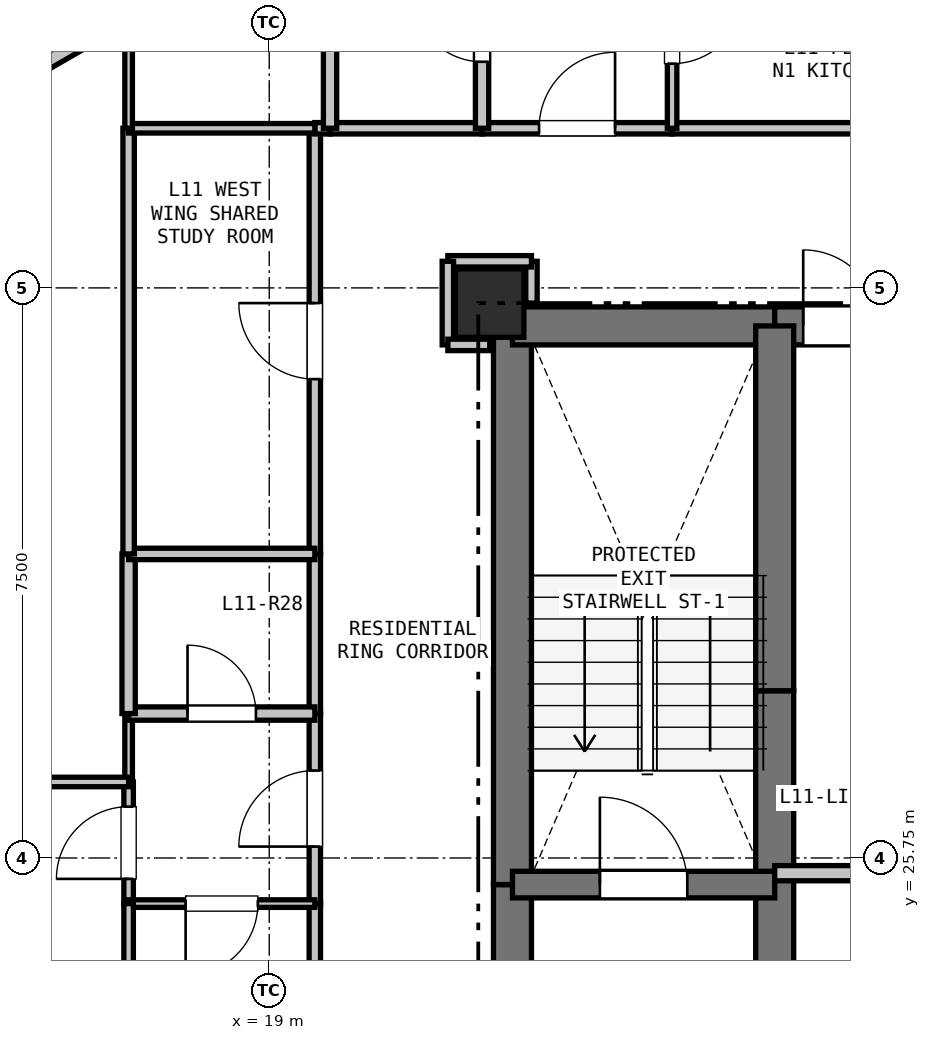
"""IFC4 building model, lengths in metres.
Left out: names, types, materials, properties, quantities, classifications, styles, units other than length and angle.
Written with IfcOpenShell. Run it as: python <this file> out.ifc"""

import sys

from ifc_helpers import new_model, si_unit, direction, frame, frame_2d, origin, origin_2d, place, context, subcontext, project, spatial, rectangle, extrude, element, fill, save


model = new_model("IFC4")
c1 = context("Model", 3, precision=1e-05, world=origin(), true_north=direction((0.0, 1.0)))
c2 = subcontext(c1, "Body", "Model", "MODEL_VIEW")
j1 = project(units=[si_unit("LENGTHUNIT", "METRE"), si_unit("PLANEANGLEUNIT", "RADIAN")], contexts=[c1])
p1 = place(None, origin())
s1 = spatial("IfcSite", under=j1, at=p1, CompositionType="ELEMENT")
p2 = place(p1, origin())
s2 = spatial("IfcBuilding", under=s1, at=p2, CompositionType="ELEMENT")
p3 = place(p2, frame((0.0, 0.0, 42.3)))
s3 = spatial("IfcBuildingStorey", under=s2, at=p3, CompositionType="ELEMENT", Elevation=42.3)
p4 = place(p3, frame((21.9, 33.05, 0.0), z_axis=(0.0, 0.0, 1.0), x_axis=(1.0, 0.0, 0.0)))
e1 = element("IfcColumn", 1, at=p4, inside=s3, PredefinedType="COLUMN", context=c2, shape_type="SweptSolid", body=[
    extrude(rectangle(XDim=0.9, YDim=0.9, at=origin_2d()), origin(), (0.0, 0.0, 1.0), 3.3),
])
p5 = place(p3, frame((15.008, 35.611, 0.0), z_axis=(0.0, 0.0, 1.0), x_axis=(0.86605165483, 0.499954529098, 0.0)))
e2 = element("IfcWall", 2, at=p5, inside=s3, PredefinedType="PARAPET", context=c2, shape_type="SweptSolid", body=[
    extrude(rectangle(XDim=1.7, YDim=0.2, at=frame_2d((0.85, 0.0))), origin(), (0.0, 0.0, 1.0), 2.66),
])
p6 = place(p3, frame((22.2, 20.75, 0.0), z_axis=(0.0, 0.0, 1.0), x_axis=(0.0, 1.0, 0.0)))
e3 = element("IfcWall", 3, at=p6, inside=s3, PredefinedType="SHEAR", context=c2, shape_type="SweptSolid", body=[
    extrude(rectangle(XDim=4.65, YDim=0.5, at=frame_2d((2.325, 0.0))), origin(), (0.0, 0.0, 1.0), 3.04),
])
p7 = place(p3, frame((22.2, 25.4, 0.0), z_axis=(0.0, 0.0, 1.0), x_axis=(0.0, 1.0, 0.0)))
e4 = element("IfcWall", 4, at=p7, inside=s3, PredefinedType="SHEAR", context=c2, shape_type="SweptSolid", body=[
    extrude(rectangle(XDim=7.35, YDim=0.5, at=frame_2d((3.675, 0.0))), origin(), (0.0, 0.0, 1.0), 3.04),
])
p8 = place(p3, frame((22.2, 32.75, 0.0), z_axis=(0.0, 0.0, 1.0), x_axis=(1.0, 0.0, 0.0)))
e5 = element("IfcWall", 5, at=p8, inside=s3, PredefinedType="SHEAR", context=c2, shape_type="SweptSolid", body=[
    extrude(rectangle(XDim=3.45, YDim=0.5, at=frame_2d((1.725, 0.0))), origin(), (0.0, 0.0, 1.0), 3.04),
])
p9 = place(p3, frame((25.65, 32.75, 0.0), z_axis=(0.0, 0.0, 1.0), x_axis=(1.0, 0.0, 0.0)))
e6 = element("IfcWall", 6, at=p9, inside=s3, PredefinedType="SHEAR", context=c2, shape_type="SweptSolid", body=[
    extrude(rectangle(XDim=1.75, YDim=0.5, at=frame_2d((0.875, 0.0))), origin(), (0.0, 0.0, 1.0), 3.04),
])
p10 = place(p9, frame((0.375, 0.0, 0.0)))
e7 = element("IfcOpeningElement", 7, at=p10, cuts=e6, PredefinedType="OPENING", context=c2, shape_type="SweptSolid", body=[
    extrude(rectangle(XDim=1.0, YDim=2.15, at=frame_2d((0.5, 1.075))), frame((0.0, 0.26, 0.0), z_axis=(0.0, -1.0, 0.0), x_axis=(1.0, 0.0, 0.0)), (0.0, 0.0, 1.0), 0.52),
])
p11 = place(p3, frame((25.65, 22.75, 0.0), z_axis=(0.0, 0.0, 1.0), x_axis=(0.0, 1.0, 0.0)))
e8 = element("IfcWall", 8, at=p11, inside=s3, PredefinedType="SHEAR", context=c2, shape_type="SweptSolid", body=[
    extrude(rectangle(XDim=2.8, YDim=0.5, at=frame_2d((1.4, 0.0))), origin(), (0.0, 0.0, 1.0), 3.04),
])
p12 = place(p3, frame((25.65, 25.55, 0.0), z_axis=(0.0, 0.0, 1.0), x_axis=(0.0, 1.0, 0.0)))
e9 = element("IfcWall", 9, at=p12, inside=s3, PredefinedType="SHEAR", context=c2, shape_type="SweptSolid", body=[
    extrude(rectangle(XDim=2.4, YDim=0.5, at=frame_2d((1.2, 0.0))), origin(), (0.0, 0.0, 1.0), 3.04),
])
p13 = place(p3, frame((25.65, 27.95, 0.0), z_axis=(0.0, 0.0, 1.0), x_axis=(0.0, 1.0, 0.0)))
e10 = element("IfcWall", 10, at=p13, inside=s3, PredefinedType="SHEAR", context=c2, shape_type="SweptSolid", body=[
    extrude(rectangle(XDim=4.8, YDim=0.5, at=frame_2d((2.4, 0.0))), origin(), (0.0, 0.0, 1.0), 3.04),
])
p14 = place(p3, frame((22.2, 25.4, 0.0), z_axis=(0.0, 0.0, 1.0), x_axis=(1.0, 0.0, 0.0)))
e11 = element("IfcWall", 11, at=p14, inside=s3, PredefinedType="SHEAR", context=c2, shape_type="SweptSolid", body=[
    extrude(rectangle(XDim=3.45, YDim=0.35, at=frame_2d((1.725, 0.0))), origin(), (0.0, 0.0, 1.0), 3.04),
])
p15 = place(p14, frame((1.15, 0.0, 0.0)))
e12 = element("IfcOpeningElement", 12, at=p15, cuts=e11, PredefinedType="OPENING", context=c2, shape_type="SweptSolid", body=[
    extrude(rectangle(XDim=1.15, YDim=2.15, at=frame_2d((0.575, 1.075))), frame((0.0, 0.185, 0.0), z_axis=(0.0, -1.0, 0.0), x_axis=(1.0, 0.0, 0.0)), (0.0, 0.0, 1.0), 0.37),
])
p16 = place(p3, frame((25.65, 25.55, 0.0), z_axis=(0.0, 0.0, 1.0), x_axis=(1.0, 0.0, 0.0)))
e13 = element("IfcWall", 13, at=p16, inside=s3, PredefinedType="PARTITIONING", context=c2, shape_type="SweptSolid", body=[
    extrude(rectangle(XDim=4.95, YDim=0.2, at=frame_2d((2.475, 0.0))), origin(), (0.0, 0.0, 1.0), 3.04),
])
p17 = place(p3, frame((19.6, 21.15, 0.0), z_axis=(0.0, 0.0, 1.0), x_axis=(0.0, 1.0, 0.0)))
e14 = element("IfcWall", 14, at=p17, inside=s3, PredefinedType="PARTITIONING", context=c2, shape_type="SweptSolid", body=[
    extrude(rectangle(XDim=4.0, YDim=0.15, at=frame_2d((2.0, 0.0))), origin(), (0.0, 0.0, 1.0), 3.04),
])
p18 = place(p3, frame((19.6, 25.15, 0.0), z_axis=(0.0, 0.0, 1.0), x_axis=(0.0, 1.0, 0.0)))
e15 = element("IfcWall", 15, at=p18, inside=s3, PredefinedType="PARTITIONING", context=c2, shape_type="SweptSolid", body=[
    extrude(rectangle(XDim=2.5, YDim=0.15, at=frame_2d((1.25, 0.0))), origin(), (0.0, 0.0, 1.0), 3.04),
])
p19 = place(p18, frame((0.75, 0.0, 0.0)))
e16 = element("IfcOpeningElement", 16, at=p19, cuts=e15, PredefinedType="OPENING", context=c2, shape_type="SweptSolid", body=[
    extrude(rectangle(XDim=1.0, YDim=2.15, at=frame_2d((0.5, 1.075))), frame((0.0, 0.085, 0.0), z_axis=(0.0, -1.0, 0.0), x_axis=(1.0, 0.0, 0.0)), (0.0, 0.0, 1.0), 0.17),
])
p20 = place(p3, frame((19.6, 27.65, 0.0), z_axis=(0.0, 0.0, 1.0), x_axis=(0.0, 1.0, 0.0)))
e17 = element("IfcWall", 17, at=p20, inside=s3, PredefinedType="PARTITIONING", context=c2, shape_type="SweptSolid", body=[
    extrude(rectangle(XDim=2.1, YDim=0.15, at=frame_2d((1.05, 0.0))), origin(), (0.0, 0.0, 1.0), 3.04),
])
p21 = place(p3, frame((19.6, 29.75, 0.0), z_axis=(0.0, 0.0, 1.0), x_axis=(0.0, 1.0, 0.0)))
e18 = element("IfcWall", 18, at=p21, inside=s3, PredefinedType="PARTITIONING", context=c2, shape_type="SweptSolid", body=[
    extrude(rectangle(XDim=5.6, YDim=0.15, at=frame_2d((2.8, 0.0))), origin(), (0.0, 0.0, 1.0), 2.337),
])
p22 = place(p21, frame((2.3, 0.0, 0.0)))
e19 = element("IfcOpeningElement", 19, at=p22, cuts=e18, PredefinedType="OPENING", context=c2, shape_type="SweptSolid", body=[
    extrude(rectangle(XDim=1.0, YDim=2.15, at=frame_2d((0.5, 1.075))), frame((0.0, 0.085, 0.0), z_axis=(0.0, -1.0, 0.0), x_axis=(1.0, 0.0, 0.0)), (0.0, 0.0, 1.0), 0.17),
])
p23 = place(p3, frame((19.6, 35.35, 0.0), z_axis=(0.0, 0.0, 1.0), x_axis=(1.0, 0.0, 0.0)))
e20 = element("IfcWall", 20, at=p23, inside=s3, PredefinedType="PARTITIONING", context=c2, shape_type="SweptSolid", body=[
    extrude(rectangle(XDim=0.2, YDim=0.15, at=frame_2d((0.1, 0.0))), origin(), (0.0, 0.0, 1.0), 3.04),
])
p24 = place(p3, frame((19.8, 35.35, 0.0), z_axis=(0.0, 0.0, 1.0), x_axis=(1.0, 0.0, 0.0)))
e21 = element("IfcWall", 21, at=p24, inside=s3, PredefinedType="PARTITIONING", context=c2, shape_type="SweptSolid", body=[
    extrude(rectangle(XDim=2.0, YDim=0.15, at=frame_2d((1.0, 0.0))), origin(), (0.0, 0.0, 1.0), 3.04),
])
p25 = place(p3, frame((21.8, 35.35, 0.0), z_axis=(0.0, 0.0, 1.0), x_axis=(1.0, 0.0, 0.0)))
e22 = element("IfcWall", 22, at=p25, inside=s3, PredefinedType="PARTITIONING", context=c2, shape_type="SweptSolid", body=[
    extrude(rectangle(XDim=2.5, YDim=0.15, at=frame_2d((1.25, 0.0))), origin(), (0.0, 0.0, 1.0), 3.04),
])
p26 = place(p25, frame((0.75, 0.0, 0.0)))
e23 = element("IfcOpeningElement", 23, at=p26, cuts=e22, PredefinedType="OPENING", context=c2, shape_type="SweptSolid", body=[
    extrude(rectangle(XDim=1.0, YDim=2.15, at=frame_2d((0.5, 1.075))), frame((0.0, 0.085, 0.0), z_axis=(0.0, -1.0, 0.0), x_axis=(1.0, 0.0, 0.0)), (0.0, 0.0, 1.0), 0.17),
])
p27 = place(p3, frame((24.3, 35.35, 0.0), z_axis=(0.0, 0.0, 1.0), x_axis=(1.0, 0.0, 0.0)))
e24 = element("IfcWall", 24, at=p27, inside=s3, PredefinedType="PARTITIONING", context=c2, shape_type="SweptSolid", body=[
    extrude(rectangle(XDim=3.1, YDim=0.15, at=frame_2d((1.55, 0.0))), origin(), (0.0, 0.0, 1.0), 3.04),
])
p28 = place(p3, frame((22.45, 33.05, 0.0), z_axis=(0.0, 0.0, 1.0), x_axis=(0.0, 1.0, 0.0)))
e25 = element("IfcWall", 25, at=p28, inside=s3, PredefinedType="PARTITIONING", context=c2, shape_type="SweptSolid", body=[
    extrude(rectangle(XDim=0.55, YDim=0.15, at=frame_2d((0.275, 0.0))), origin(), (0.0, 0.0, 1.0), 2.488),
])
p29 = place(p3, frame((22.45, 33.6, 0.0), z_axis=(0.0, 0.0, 1.0), x_axis=(-1.0, 0.0, 0.0)))
e26 = element("IfcWall", 26, at=p29, inside=s3, PredefinedType="PARTITIONING", context=c2, shape_type="SweptSolid", body=[
    extrude(rectangle(XDim=1.1, YDim=0.15, at=frame_2d((0.55, 0.0))), origin(), (0.0, 0.0, 1.0), 3.04),
])
p30 = place(p3, frame((21.35, 33.6, 0.0), z_axis=(0.0, 0.0, 1.0), x_axis=(0.0, -1.0, 0.0)))
e27 = element("IfcWall", 27, at=p30, inside=s3, PredefinedType="PARTITIONING", context=c2, shape_type="SweptSolid", body=[
    extrude(rectangle(XDim=1.1, YDim=0.15, at=frame_2d((0.55, 0.0))), origin(), (0.0, 0.0, 1.0), 2.337),
])
p31 = place(p3, frame((21.35, 32.5, 0.0), z_axis=(0.0, 0.0, 1.0), x_axis=(1.0, 0.0, 0.0)))
e28 = element("IfcWall", 28, at=p31, inside=s3, PredefinedType="PARTITIONING", context=c2, shape_type="SweptSolid", body=[
    extrude(rectangle(XDim=0.55, YDim=0.15, at=frame_2d((0.275, 0.0))), origin(), (0.0, 0.0, 1.0), 2.488),
])
p32 = place(p3, frame((24.3, 38.0, 0.0), z_axis=(0.0, 0.0, 1.0), x_axis=(0.0, -1.0, 0.0)))
e29 = element("IfcWall", 29, at=p32, inside=s3, PredefinedType="PARTITIONING", context=c2, shape_type="SweptSolid", body=[
    extrude(rectangle(XDim=2.65, YDim=0.125, at=frame_2d((1.325, 0.0))), origin(), (0.0, 0.0, 1.0), 3.04),
])
p33 = place(p32, frame((0.85, 0.0, 0.0)))
e30 = element("IfcOpeningElement", 30, at=p33, cuts=e29, PredefinedType="OPENING", context=c2, shape_type="SweptSolid", body=[
    extrude(rectangle(XDim=0.95, YDim=2.1, at=frame_2d((0.475, 1.05))), frame((0.0, 0.073, 0.0), z_axis=(0.0, -1.0, 0.0), x_axis=(1.0, 0.0, 0.0)), (0.0, 0.0, 1.0), 0.145),
])
p34 = place(p3, frame((21.8, 35.35, 0.0), z_axis=(0.0, 0.0, 1.0), x_axis=(0.0, 1.0, 0.0)))
e31 = element("IfcWall", 31, at=p34, inside=s3, PredefinedType="PLUMBINGWALL", context=c2, shape_type="SweptSolid", body=[
    extrude(rectangle(XDim=2.65, YDim=0.175, at=frame_2d((1.325, 0.0))), origin(), (0.0, 0.0, 1.0), 3.04),
])
p35 = place(p34, frame((0.875, 0.0, 0.0)))
e32 = element("IfcOpeningElement", 32, at=p35, cuts=e31, PredefinedType="OPENING", context=c2, shape_type="SweptSolid", body=[
    extrude(rectangle(XDim=0.9, YDim=2.1, at=frame_2d((0.45, 1.05))), frame((0.0, 0.097, 0.0), z_axis=(0.0, -1.0, 0.0), x_axis=(1.0, 0.0, 0.0)), (0.0, 0.0, 1.0), 0.195),
])
p36 = place(p3, frame((17.15, 25.15, 0.0), z_axis=(0.0, 0.0, 1.0), x_axis=(0.0, 1.0, 0.0)))
e33 = element("IfcWall", 33, at=p36, inside=s3, PredefinedType="PARTITIONING", context=c2, shape_type="SweptSolid", body=[
    extrude(rectangle(XDim=1.6, YDim=0.125, at=frame_2d((0.8, 0.0))), origin(), (0.0, 0.0, 1.0), 3.04),
])
p37 = place(p36, frame((0.325, 0.0, 0.0)))
e34 = element("IfcOpeningElement", 34, at=p37, cuts=e33, PredefinedType="OPENING", context=c2, shape_type="SweptSolid", body=[
    extrude(rectangle(XDim=0.95, YDim=2.1, at=frame_2d((0.475, 1.05))), frame((0.0, 0.073, 0.0), z_axis=(0.0, -1.0, 0.0), x_axis=(1.0, 0.0, 0.0)), (0.0, 0.0, 1.0), 0.145),
])
p38 = place(p3, frame((17.15, 26.75, 0.0), z_axis=(0.0, 0.0, 1.0), x_axis=(0.0, 1.0, 0.0)))
e35 = element("IfcWall", 35, at=p38, inside=s3, PredefinedType="PARTITIONING", context=c2, shape_type="SweptSolid", body=[
    extrude(rectangle(XDim=0.9, YDim=0.1, at=frame_2d((0.45, 0.0))), origin(), (0.0, 0.0, 1.0), 3.04),
])
p39 = place(p3, frame((17.15, 27.65, 0.0), z_axis=(0.0, 0.0, 1.0), x_axis=(1.0, 0.0, 0.0)))
e36 = element("IfcWall", 36, at=p39, inside=s3, PredefinedType="PLUMBINGWALL", context=c2, shape_type="SweptSolid", body=[
    extrude(rectangle(XDim=2.45, YDim=0.175, at=frame_2d((1.225, 0.0))), origin(), (0.0, 0.0, 1.0), 3.04),
])
p40 = place(p39, frame((0.775, 0.0, 0.0)))
e37 = element("IfcOpeningElement", 37, at=p40, cuts=e36, PredefinedType="OPENING", context=c2, shape_type="SweptSolid", body=[
    extrude(rectangle(XDim=0.9, YDim=2.1, at=frame_2d((0.45, 1.05))), frame((0.0, 0.097, 0.0), z_axis=(0.0, -1.0, 0.0), x_axis=(1.0, 0.0, 0.0)), (0.0, 0.0, 1.0), 0.195),
])
p41 = place(p3, frame((19.6, 25.15, 0.0), z_axis=(0.0, 0.0, 1.0), x_axis=(-1.0, 0.0, 0.0)))
e38 = element("IfcWall", 38, at=p41, inside=s3, PredefinedType="PARTITIONING", context=c2, shape_type="SweptSolid", body=[
    extrude(rectangle(XDim=2.45, YDim=0.1, at=frame_2d((1.225, 0.0))), origin(), (0.0, 0.0, 1.0), 3.04),
])
p42 = place(p41, frame((0.75, 0.0, 0.0)))
e39 = element("IfcOpeningElement", 39, at=p42, cuts=e38, PredefinedType="OPENING", context=c2, shape_type="SweptSolid", body=[
    extrude(rectangle(XDim=0.95, YDim=2.1, at=frame_2d((0.475, 1.05))), frame((0.0, 0.06, 0.0), z_axis=(0.0, -1.0, 0.0), x_axis=(1.0, 0.0, 0.0)), (0.0, 0.0, 1.0), 0.12),
])
p43 = place(p3, frame((19.8, 35.35, 0.0), z_axis=(0.0, 0.0, 1.0), x_axis=(0.0, 1.0, 0.0)))
e40 = element("IfcWall", 40, at=p43, inside=s3, PredefinedType="PLUMBINGWALL", context=c2, shape_type="SweptSolid", body=[
    extrude(rectangle(XDim=3.194, YDim=0.175, at=frame_2d((1.597, 0.0))), origin(), (0.0, 0.0, 1.0), 2.365),
])
p44 = place(p3, frame((17.15, 27.65, 0.0), z_axis=(0.0, 0.0, 1.0), x_axis=(0.0, 1.0, 0.0)))
e41 = element("IfcWall", 41, at=p44, inside=s3, PredefinedType="PLUMBINGWALL", context=c2, shape_type="SweptSolid", body=[
    extrude(rectangle(XDim=2.1, YDim=0.175, at=frame_2d((1.05, 0.0))), origin(), (0.0, 0.0, 1.0), 3.04),
])
p45 = place(p3, frame((17.15, 29.75, 0.0), z_axis=(0.0, 0.0, 1.0), x_axis=(1.0, 0.0, 0.0)))
e42 = element("IfcWall", 42, at=p45, inside=s3, PredefinedType="PARTITIONING", context=c2, shape_type="SweptSolid", body=[
    extrude(rectangle(XDim=2.45, YDim=0.15, at=frame_2d((1.225, 0.0))), origin(), (0.0, 0.0, 1.0), 3.04),
])
p46 = place(p3, frame((17.15, 21.15, 0.0), z_axis=(0.0, 0.0, 1.0), x_axis=(0.0, 1.0, 0.0)))
e43 = element("IfcWall", 43, at=p46, inside=s3, PredefinedType="PARTITIONING", context=c2, shape_type="SweptSolid", body=[
    extrude(rectangle(XDim=4.0, YDim=0.125, at=frame_2d((2.0, 0.0))), origin(), (0.0, 0.0, 1.0), 2.337),
])
p47 = place(p46, frame((1.525, 0.0, 0.0)))
e44 = element("IfcOpeningElement", 44, at=p47, cuts=e43, PredefinedType="OPENING", context=c2, shape_type="SweptSolid", body=[
    extrude(rectangle(XDim=0.95, YDim=2.1, at=frame_2d((0.475, 1.05))), frame((0.0, 0.073, 0.0), z_axis=(0.0, -1.0, 0.0), x_axis=(1.0, 0.0, 0.0)), (0.0, 0.0, 1.0), 0.145),
])
p48 = place(p3, frame((17.15, 29.75, 0.0), z_axis=(0.0, 0.0, 1.0), x_axis=(0.0, 1.0, 0.0)))
e45 = element("IfcWall", 45, at=p48, inside=s3, PredefinedType="PARTITIONING", context=c2, shape_type="SweptSolid", body=[
    extrude(rectangle(XDim=5.6, YDim=0.15, at=frame_2d((2.8, 0.0))), origin(), (0.0, 0.0, 1.0), 2.337),
])
p49 = place(p3, frame((17.15, 35.35, 0.0), z_axis=(0.0, 0.0, 1.0), x_axis=(1.0, 0.0, 0.0)))
e46 = element("IfcWall", 46, at=p49, inside=s3, PredefinedType="PARTITIONING", context=c2, shape_type="SweptSolid", body=[
    extrude(rectangle(XDim=2.45, YDim=0.125, at=frame_2d((1.225, 0.0))), origin(), (0.0, 0.0, 1.0), 3.04),
])
p50 = place(p3, frame((17.15, 37.014, 0.0), z_axis=(0.0, 0.0, 1.0), x_axis=(0.0, -1.0, 0.0)))
e47 = element("IfcWall", 47, at=p50, inside=s3, PredefinedType="PARTITIONING", context=c2, shape_type="SweptSolid", body=[
    extrude(rectangle(XDim=1.664, YDim=0.1, at=frame_2d((0.832, 0.0))), origin(), (0.0, 0.0, 1.0), 2.365),
])
p51 = place(p3, frame((17.15, 26.75, 0.0), z_axis=(0.0, 0.0, 1.0), x_axis=(-1.0, 0.0, 0.0)))
e48 = element("IfcWall", 48, at=p51, inside=s3, PredefinedType="PARTITIONING", context=c2, shape_type="SweptSolid", body=[
    extrude(rectangle(XDim=6.67, YDim=0.125, at=frame_2d((3.335, 0.0))), origin(), (0.0, 0.0, 1.0), 3.04),
])
p52 = place(p51, frame((2.86, 0.0, 0.0)))
e49 = element("IfcOpeningElement", 49, at=p52, cuts=e48, PredefinedType="OPENING", context=c2, shape_type="SweptSolid", body=[
    extrude(rectangle(XDim=0.95, YDim=2.1, at=frame_2d((0.475, 1.05))), frame((0.0, 0.073, 0.0), z_axis=(0.0, -1.0, 0.0), x_axis=(1.0, 0.0, 0.0)), (0.0, 0.0, 1.0), 0.145),
])
p53 = place(p10, origin())
e50 = element("IfcDoor", 50, at=p53, inside=s3, OperationType="SINGLE_SWING_LEFT", PredefinedType="DOOR", context=c2, shape_type="SweptSolid", body=[
    extrude(rectangle(XDim=1.0, YDim=2.15, at=frame_2d((0.5, 1.075))), frame((0.0, 0.025, 0.0), z_axis=(0.0, -1.0, 0.0), x_axis=(1.0, 0.0, 0.0)), (0.0, 0.0, 1.0), 0.05),
])
fill(e7, e50)
p54 = place(p15, origin())
e51 = element("IfcDoor", 51, at=p54, inside=s3, OperationType="SINGLE_SWING_LEFT", PredefinedType="DOOR", context=c2, shape_type="SweptSolid", body=[
    extrude(rectangle(XDim=1.15, YDim=2.15, at=frame_2d((0.575, 1.075))), frame((0.0, 0.025, 0.0), z_axis=(0.0, -1.0, 0.0), x_axis=(1.0, 0.0, 0.0)), (0.0, 0.0, 1.0), 0.05),
])
fill(e12, e51)
p55 = place(p26, origin())
e52 = element("IfcDoor", 52, at=p55, inside=s3, OperationType="SINGLE_SWING_RIGHT", PredefinedType="DOOR", context=c2, shape_type="SweptSolid", body=[
    extrude(rectangle(XDim=1.0, YDim=2.15, at=frame_2d((0.5, 1.075))), frame((0.0, 0.025, 0.0), z_axis=(0.0, -1.0, 0.0), x_axis=(1.0, 0.0, 0.0)), (0.0, 0.0, 1.0), 0.05),
])
fill(e23, e52)
p56 = place(p19, origin())
e53 = element("IfcDoor", 53, at=p56, inside=s3, OperationType="SINGLE_SWING_LEFT", PredefinedType="DOOR", context=c2, shape_type="SweptSolid", body=[
    extrude(rectangle(XDim=1.0, YDim=2.15, at=frame_2d((0.5, 1.075))), frame((0.0, 0.025, 0.0), z_axis=(0.0, -1.0, 0.0), x_axis=(1.0, 0.0, 0.0)), (0.0, 0.0, 1.0), 0.05),
])
fill(e16, e53)
p57 = place(p22, origin())
e54 = element("IfcDoor", 54, at=p57, inside=s3, OperationType="SINGLE_SWING_RIGHT", PredefinedType="DOOR", context=c2, shape_type="SweptSolid", body=[
    extrude(rectangle(XDim=1.0, YDim=2.15, at=frame_2d((0.5, 1.075))), frame((0.0, 0.025, 0.0), z_axis=(0.0, -1.0, 0.0), x_axis=(1.0, 0.0, 0.0)), (0.0, 0.0, 1.0), 0.05),
])
fill(e19, e54)
p58 = place(p35, origin())
e55 = element("IfcDoor", 55, at=p58, inside=s3, OperationType="SINGLE_SWING_RIGHT", PredefinedType="DOOR", context=c2, shape_type="SweptSolid", body=[
    extrude(rectangle(XDim=0.9, YDim=2.1, at=frame_2d((0.45, 1.05))), frame((0.0, 0.025, 0.0), z_axis=(0.0, -1.0, 0.0), x_axis=(1.0, 0.0, 0.0)), (0.0, 0.0, 1.0), 0.05),
])
fill(e32, e55)
p59 = place(p33, origin())
e56 = element("IfcDoor", 56, at=p59, inside=s3, OperationType="SINGLE_SWING_LEFT", PredefinedType="DOOR", context=c2, shape_type="SweptSolid", body=[
    extrude(rectangle(XDim=0.95, YDim=2.1, at=frame_2d((0.475, 1.05))), frame((0.0, 0.025, 0.0), z_axis=(0.0, -1.0, 0.0), x_axis=(1.0, 0.0, 0.0)), (0.0, 0.0, 1.0), 0.05),
])
fill(e30, e56)
p60 = place(p40, origin())
e57 = element("IfcDoor", 57, at=p60, inside=s3, OperationType="SINGLE_SWING_LEFT", PredefinedType="DOOR", context=c2, shape_type="SweptSolid", body=[
    extrude(rectangle(XDim=0.9, YDim=2.1, at=frame_2d((0.45, 1.05))), frame((0.0, 0.025, 0.0), z_axis=(0.0, -1.0, 0.0), x_axis=(1.0, 0.0, 0.0)), (0.0, 0.0, 1.0), 0.05),
])
fill(e37, e57)
p61 = place(p42, origin())
e58 = element("IfcDoor", 58, at=p61, inside=s3, OperationType="SINGLE_SWING_RIGHT", PredefinedType="DOOR", context=c2, shape_type="SweptSolid", body=[
    extrude(rectangle(XDim=0.95, YDim=2.1, at=frame_2d((0.475, 1.05))), frame((0.0, 0.025, 0.0), z_axis=(0.0, -1.0, 0.0), x_axis=(1.0, 0.0, 0.0)), (0.0, 0.0, 1.0), 0.05),
])
fill(e39, e58)
p62 = place(p37, origin())
e59 = element("IfcDoor", 59, at=p62, inside=s3, OperationType="SINGLE_SWING_LEFT", PredefinedType="DOOR", context=c2, shape_type="SweptSolid", body=[
    extrude(rectangle(XDim=0.95, YDim=2.1, at=frame_2d((0.475, 1.05))), frame((0.0, 0.025, 0.0), z_axis=(0.0, -1.0, 0.0), x_axis=(1.0, 0.0, 0.0)), (0.0, 0.0, 1.0), 0.05),
])
fill(e34, e59)
save(model, sys.argv[1])
